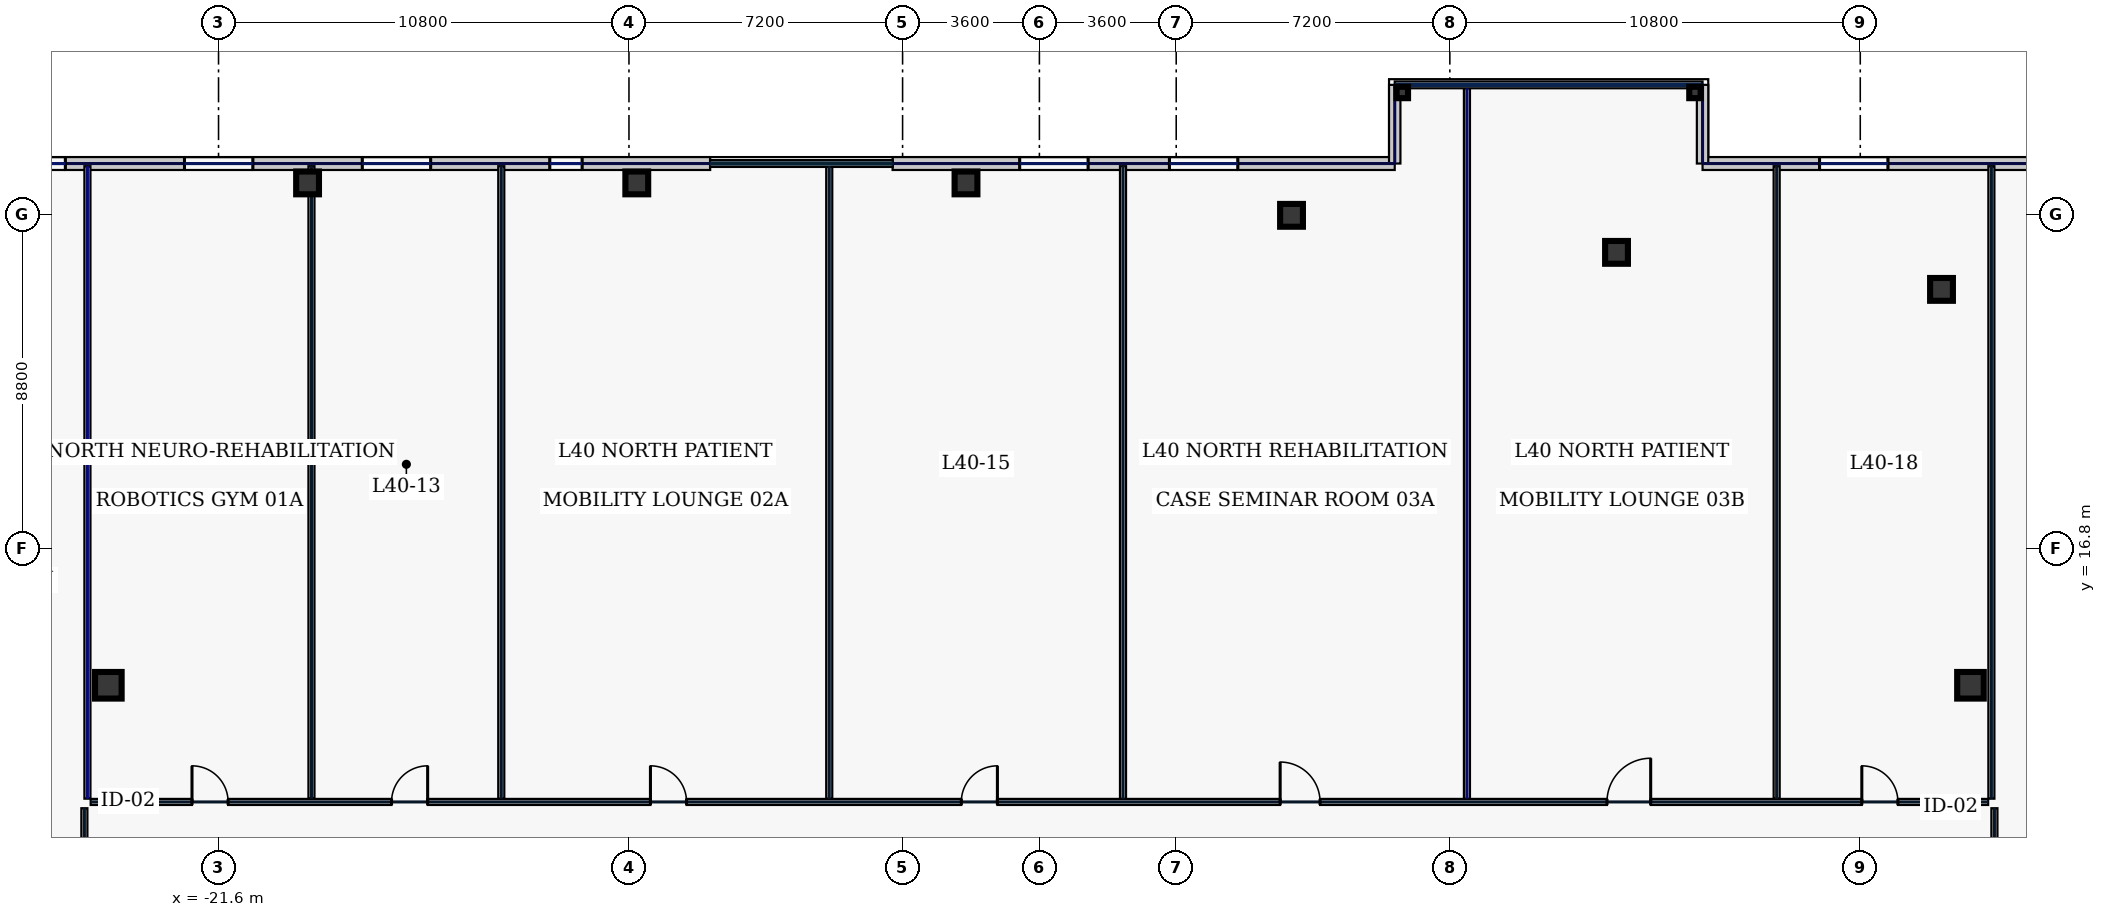
"""IFC4 building model, lengths in metres.
Left out: names, types, materials, properties, quantities, classifications, styles, units other than length and angle.
Written with IfcOpenShell. Run it as: python <this file> out.ifc"""

import sys

from ifc_helpers import new_model, si_unit, direction, frame, frame_2d, origin, origin_2d, place, context, subcontext, project, spatial, rectangle, hollow_rectangle, extrude, element, fill, save


model = new_model("IFC4")
c1 = context("Model", 3, precision=1e-05, world=origin(), true_north=direction((0.0, 1.0)))
c2 = subcontext(c1, "Body", "Model", "MODEL_VIEW")
j1 = project(units=[si_unit("LENGTHUNIT", "METRE"), si_unit("PLANEANGLEUNIT", "RADIAN")], contexts=[c1])
p1 = place(None, origin())
s1 = spatial("IfcSite", under=j1, at=p1, CompositionType="ELEMENT")
p2 = place(p1, origin())
s2 = spatial("IfcBuilding", under=s1, at=p2, CompositionType="ELEMENT")
p3 = place(p2, frame((0.0, 0.0, 176.2)))
s3 = spatial("IfcBuildingStorey", under=s2, at=p3, CompositionType="ELEMENT", Elevation=176.2)
for number, where, z_axis, x_axis in (
    (1, (-24.5, 13.2, 0.0), (0.0, 0.0, 1.0), (1.0, 0.0, 0.0)),
    (2, (24.5, 13.2, 0.0), (0.0, 0.0, 1.0), (1.0, 0.0, 0.0)),
):
    element("IfcColumn", number, at=place(p3, frame(where, z_axis=z_axis, x_axis=x_axis)), inside=s3, PredefinedType="COLUMN", context=c2, shape_type="SweptSolid", body=[
        extrude(hollow_rectangle(XDim=0.7, YDim=0.7, WallThickness=0.032, at=origin_2d()), origin(), (0.0, 0.0, 1.0), 3.74),
    ])
for number, where, z_axis, x_axis in (
    (3, (23.738, 23.618, 0.0), (0.0, 0.0, 1.0), (1.0, 0.0, 0.0)),
    (4, (15.186, 24.592, 0.0), (0.0, 0.0, 1.0), (1.0, 0.0, 0.0)),
    (5, (6.634, 25.567, 0.0), (0.0, 0.0, 1.0), (1.0, 0.0, 0.0)),
    (6, (-1.931, 26.42, 0.0), (0.0, 0.0, 1.0), (1.0, 0.0, 0.0)),
    (7, (-10.594, 26.42, 0.0), (0.0, 0.0, 1.0), (1.0, 0.0, 0.0)),
    (8, (-19.257, 26.42, 0.0), (0.0, 0.0, 1.0), (1.0, 0.0, 0.0)),
):
    element("IfcColumn", number, at=place(p3, frame(where, z_axis=z_axis, x_axis=x_axis)), inside=s3, PredefinedType="COLUMN", context=c2, shape_type="SweptSolid", body=[
        extrude(hollow_rectangle(XDim=0.6, YDim=0.6, WallThickness=0.028, at=origin_2d()), origin(), (0.0, 0.0, 1.0), 3.74),
    ])
for number, where, z_axis, x_axis in (
    (9, (9.55, 28.8, 0.0), (0.0, 0.0, 1.0), (1.0, 0.0, 0.0)),
    (10, (17.25, 28.8, 0.0), (0.0, 0.0, 1.0), (1.0, 0.0, 0.0)),
):
    element("IfcColumn", number, at=place(p3, frame(where, z_axis=z_axis, x_axis=x_axis)), inside=s3, PredefinedType="COLUMN", context=c2, shape_type="SweptSolid", body=[
        extrude(hollow_rectangle(XDim=0.3, YDim=0.3, WallThickness=0.016, at=origin_2d()), origin(), (0.0, 0.0, 1.0), 3.74),
    ])
p4 = place(p3, frame((33.4, 26.93, 0.0), z_axis=(0.0, 0.0, 1.0), x_axis=(-1.0, 0.0, 0.0)))
e11 = element("IfcWall", 11, at=p4, inside=s3, PredefinedType="STANDARD", context=c2, shape_type="SweptSolid", body=[
    extrude(rectangle(XDim=15.95, YDim=0.34, at=frame_2d((7.975, 0.0))), origin(), (0.0, 0.0, 1.0), 3.74),
])
p5 = place(p4, frame((11.071, 0.0, 0.7)))
e12 = element("IfcOpeningElement", 12, at=p5, cuts=e11, PredefinedType="OPENING", context=c2, shape_type="SweptSolid", body=[
    extrude(rectangle(XDim=1.8, YDim=2.2, at=frame_2d((0.9, 1.1))), frame((0.0, 0.18, 0.0), z_axis=(0.0, -1.0, 0.0), x_axis=(1.0, 0.0, 0.0)), (0.0, 0.0, 1.0), 0.36),
])
p6 = place(p4, frame((6.48, 0.0, 0.7)))
e13 = element("IfcOpeningElement", 13, at=p6, cuts=e11, PredefinedType="OPENING", context=c2, shape_type="SweptSolid", body=[
    extrude(rectangle(XDim=0.85, YDim=1.85, at=frame_2d((0.425, 0.925))), frame((0.0, 0.18, 0.0), z_axis=(0.0, -1.0, 0.0), x_axis=(1.0, 0.0, 0.0)), (0.0, 0.0, 1.0), 0.36),
])
p7 = place(p4, frame((2.591, 0.0, 0.7)))
e14 = element("IfcOpeningElement", 14, at=p7, cuts=e11, PredefinedType="OPENING", context=c2, shape_type="SweptSolid", body=[
    extrude(rectangle(XDim=1.8, YDim=2.2, at=frame_2d((0.9, 1.1))), frame((0.0, 0.18, 0.0), z_axis=(0.0, -1.0, 0.0), x_axis=(1.0, 0.0, 0.0)), (0.0, 0.0, 1.0), 0.36),
])
p8 = place(p3, frame((9.35, 26.93, 0.0), z_axis=(0.0, 0.0, 1.0), x_axis=(-1.0, 0.0, 0.0)))
e15 = element("IfcWall", 15, at=p8, inside=s3, PredefinedType="STANDARD", context=c2, shape_type="SweptSolid", body=[
    extrude(rectangle(XDim=13.213, YDim=0.34, at=frame_2d((6.606, 0.0))), origin(), (0.0, 0.0, 1.0), 3.74),
])
p9 = place(p8, frame((8.069, 0.0, 0.7)))
e16 = element("IfcOpeningElement", 16, at=p9, cuts=e15, PredefinedType="OPENING", context=c2, shape_type="SweptSolid", body=[
    extrude(rectangle(XDim=1.8, YDim=2.2, at=frame_2d((0.9, 1.1))), frame((0.0, 0.18, 0.0), z_axis=(0.0, -1.0, 0.0), x_axis=(1.0, 0.0, 0.0)), (0.0, 0.0, 1.0), 0.36),
])
p10 = place(p8, frame((4.128, 0.0, 0.7)))
e17 = element("IfcOpeningElement", 17, at=p10, cuts=e15, PredefinedType="OPENING", context=c2, shape_type="SweptSolid", body=[
    extrude(rectangle(XDim=1.8, YDim=2.2, at=frame_2d((0.9, 1.1))), frame((0.0, 0.18, 0.0), z_axis=(0.0, -1.0, 0.0), x_axis=(1.0, 0.0, 0.0)), (0.0, 0.0, 1.0), 0.36),
])
p11 = place(p3, frame((-8.663, 26.93, 0.0), z_axis=(0.0, 0.0, 1.0), x_axis=(-1.0, 0.0, 0.0)))
e18 = element("IfcWall", 18, at=p11, inside=s3, PredefinedType="STANDARD", context=c2, shape_type="SweptSolid", body=[
    extrude(rectangle(XDim=19.937, YDim=0.34, at=frame_2d((9.969, 0.0))), origin(), (0.0, 0.0, 1.0), 3.74),
])
p12 = place(p11, frame((16.968, 0.0, 0.7)))
e19 = element("IfcOpeningElement", 19, at=p12, cuts=e18, PredefinedType="OPENING", context=c2, shape_type="SweptSolid", body=[
    extrude(rectangle(XDim=0.85, YDim=1.85, at=frame_2d((0.425, 0.925))), frame((0.0, 0.18, 0.0), z_axis=(0.0, -1.0, 0.0), x_axis=(1.0, 0.0, 0.0)), (0.0, 0.0, 1.0), 0.36),
])
p13 = place(p11, frame((12.033, 0.0, 0.7)))
e20 = element("IfcOpeningElement", 20, at=p13, cuts=e18, PredefinedType="OPENING", context=c2, shape_type="SweptSolid", body=[
    extrude(rectangle(XDim=1.8, YDim=2.2, at=frame_2d((0.9, 1.1))), frame((0.0, 0.18, 0.0), z_axis=(0.0, -1.0, 0.0), x_axis=(1.0, 0.0, 0.0)), (0.0, 0.0, 1.0), 0.36),
])
p14 = place(p11, frame((7.355, 0.0, 0.7)))
e21 = element("IfcOpeningElement", 21, at=p14, cuts=e18, PredefinedType="OPENING", context=c2, shape_type="SweptSolid", body=[
    extrude(rectangle(XDim=1.8, YDim=2.2, at=frame_2d((0.9, 1.1))), frame((0.0, 0.18, 0.0), z_axis=(0.0, -1.0, 0.0), x_axis=(1.0, 0.0, 0.0)), (0.0, 0.0, 1.0), 0.36),
])
p15 = place(p11, frame((3.371, 0.0, 0.7)))
e22 = element("IfcOpeningElement", 22, at=p15, cuts=e18, PredefinedType="OPENING", context=c2, shape_type="SweptSolid", body=[
    extrude(rectangle(XDim=0.85, YDim=1.85, at=frame_2d((0.425, 0.925))), frame((0.0, 0.18, 0.0), z_axis=(0.0, -1.0, 0.0), x_axis=(1.0, 0.0, 0.0)), (0.0, 0.0, 1.0), 0.36),
])
for number, where, z_axis, x_axis in (
    (23, (9.35, 26.93, 0.0), (0.0, 0.0, 1.0), (0.0, 1.0, 0.0)),
    (24, (17.45, 26.93, 0.0), (0.0, 0.0, 1.0), (0.0, 1.0, 0.0)),
):
    element("IfcWall", number, at=place(p3, frame(where, z_axis=z_axis, x_axis=x_axis)), inside=s3, PredefinedType="STANDARD", context=c2, shape_type="SweptSolid", body=[
        extrude(rectangle(XDim=2.07, YDim=0.3, at=frame_2d((1.035, 0.0))), origin(), (0.0, 0.0, 1.0), 1.535),
    ])
p16 = place(p3, frame((-25.13, 6.985, 0.0), z_axis=(0.0, 0.0, 1.0), x_axis=(0.0, 1.0, 0.0)))
e25 = element("IfcWall", 25, at=p16, inside=s3, PredefinedType="PARTITIONING", context=c2, shape_type="SweptSolid", body=[
    extrude(rectangle(XDim=2.98, YDim=0.16, at=frame_2d((1.49, 0.0))), origin(), (0.0, 0.0, 1.0), 3.74),
])
p17 = place(p16, frame((1.1, 0.0, 0.0)))
e26 = element("IfcOpeningElement", 26, at=p17, cuts=e25, PredefinedType="OPENING", context=c2, shape_type="SweptSolid", body=[
    extrude(rectangle(XDim=0.95, YDim=2.2, at=frame_2d((0.475, 1.1))), frame((0.0, 0.09, 0.0), z_axis=(0.0, -1.0, 0.0), x_axis=(1.0, 0.0, 0.0)), (0.0, 0.0, 1.0), 0.18),
])
p18 = place(p3, frame((-24.965, 10.13, 0.0), z_axis=(0.0, 0.0, 1.0), x_axis=(1.0, 0.0, 0.0)))
e27 = element("IfcWall", 27, at=p18, inside=s3, PredefinedType="PARTITIONING", context=c2, shape_type="SweptSolid", body=[
    extrude(rectangle(XDim=49.93, YDim=0.16, at=frame_2d((24.965, 0.0))), origin(), (0.0, 0.0, 1.0), 3.74),
])
p19 = place(p18, frame((2.667, 0.0, 0.0)))
e28 = element("IfcOpeningElement", 28, at=p19, cuts=e27, PredefinedType="OPENING", context=c2, shape_type="SweptSolid", body=[
    extrude(rectangle(XDim=0.95, YDim=2.2, at=frame_2d((0.475, 1.1))), frame((0.0, 0.09, 0.0), z_axis=(0.0, -1.0, 0.0), x_axis=(1.0, 0.0, 0.0)), (0.0, 0.0, 1.0), 0.18),
])
p20 = place(p18, frame((7.917, 0.0, 0.0)))
e29 = element("IfcOpeningElement", 29, at=p20, cuts=e27, PredefinedType="OPENING", context=c2, shape_type="SweptSolid", body=[
    extrude(rectangle(XDim=0.95, YDim=2.2, at=frame_2d((0.475, 1.1))), frame((0.0, 0.09, 0.0), z_axis=(0.0, -1.0, 0.0), x_axis=(1.0, 0.0, 0.0)), (0.0, 0.0, 1.0), 0.18),
])
p21 = place(p18, frame((14.73, 0.0, 0.0)))
e30 = element("IfcOpeningElement", 30, at=p21, cuts=e27, PredefinedType="OPENING", context=c2, shape_type="SweptSolid", body=[
    extrude(rectangle(XDim=0.95, YDim=2.2, at=frame_2d((0.475, 1.1))), frame((0.0, 0.09, 0.0), z_axis=(0.0, -1.0, 0.0), x_axis=(1.0, 0.0, 0.0)), (0.0, 0.0, 1.0), 0.18),
])
p22 = place(p18, frame((22.91, 0.0, 0.0)))
e31 = element("IfcOpeningElement", 31, at=p22, cuts=e27, PredefinedType="OPENING", context=c2, shape_type="SweptSolid", body=[
    extrude(rectangle(XDim=0.95, YDim=2.2, at=frame_2d((0.475, 1.1))), frame((0.0, 0.09, 0.0), z_axis=(0.0, -1.0, 0.0), x_axis=(1.0, 0.0, 0.0)), (0.0, 0.0, 1.0), 0.18),
])
p23 = place(p18, frame((31.3, 0.0, 0.0)))
e32 = element("IfcOpeningElement", 32, at=p23, cuts=e27, PredefinedType="OPENING", context=c2, shape_type="SweptSolid", body=[
    extrude(rectangle(XDim=1.05, YDim=2.2, at=frame_2d((0.525, 1.1))), frame((0.0, 0.09, 0.0), z_axis=(0.0, -1.0, 0.0), x_axis=(1.0, 0.0, 0.0)), (0.0, 0.0, 1.0), 0.18),
])
p24 = place(p18, frame((39.9, 0.0, 0.0)))
e33 = element("IfcOpeningElement", 33, at=p24, cuts=e27, PredefinedType="OPENING", context=c2, shape_type="SweptSolid", body=[
    extrude(rectangle(XDim=1.15, YDim=2.2, at=frame_2d((0.575, 1.1))), frame((0.0, 0.09, 0.0), z_axis=(0.0, -1.0, 0.0), x_axis=(1.0, 0.0, 0.0)), (0.0, 0.0, 1.0), 0.18),
])
p25 = place(p18, frame((46.606, 0.0, 0.0)))
e34 = element("IfcOpeningElement", 34, at=p25, cuts=e27, PredefinedType="OPENING", context=c2, shape_type="SweptSolid", body=[
    extrude(rectangle(XDim=0.95, YDim=2.2, at=frame_2d((0.475, 1.1))), frame((0.0, 0.09, 0.0), z_axis=(0.0, -1.0, 0.0), x_axis=(1.0, 0.0, 0.0)), (0.0, 0.0, 1.0), 0.18),
])
p26 = place(p3, frame((25.13, 9.965, 0.0), z_axis=(0.0, 0.0, 1.0), x_axis=(0.0, -1.0, 0.0)))
e35 = element("IfcWall", 35, at=p26, inside=s3, PredefinedType="PARTITIONING", context=c2, shape_type="SweptSolid", body=[
    extrude(rectangle(XDim=2.98, YDim=0.16, at=frame_2d((1.49, 0.0))), origin(), (0.0, 0.0, 1.0), 3.74),
])
p27 = place(p26, frame((1.1, 0.0, 0.0)))
e36 = element("IfcOpeningElement", 36, at=p27, cuts=e35, PredefinedType="OPENING", context=c2, shape_type="SweptSolid", body=[
    extrude(rectangle(XDim=0.95, YDim=2.2, at=frame_2d((0.475, 1.1))), frame((0.0, 0.09, 0.0), z_axis=(0.0, -1.0, 0.0), x_axis=(1.0, 0.0, 0.0)), (0.0, 0.0, 1.0), 0.18),
])
p28 = place(p3, frame((-25.05, 10.215, 0.0), z_axis=(0.0, 0.0, 1.0), x_axis=(0.0, 1.0, 0.0)))
e37 = element("IfcWall", 37, at=p28, inside=s3, PredefinedType="PARTITIONING", context=c2, shape_type="SweptSolid", body=[
    extrude(rectangle(XDim=16.645, YDim=0.16, at=frame_2d((8.323, 0.0))), origin(), (0.0, 0.0, 1.0), 3.285),
])
for number, where, z_axis, x_axis in (
    (38, (25.05, 10.215, 0.0), (0.0, 0.0, 1.0), (0.0, 1.0, 0.0)),
    (39, (-14.16, 10.215, 0.0), (0.0, 0.0, 1.0), (0.0, 1.0, 0.0)),
    (40, (2.2, 10.215, 0.0), (0.0, 0.0, 1.0), (0.0, 1.0, 0.0)),
    (41, (19.4, 10.215, 0.0), (0.0, 0.0, 1.0), (0.0, 1.0, 0.0)),
    (42, (-19.155, 10.215, 0.0), (0.0, 0.0, 1.0), (0.0, 1.0, 0.0)),
    (43, (-5.53, 10.215, 0.0), (0.0, 0.0, 1.0), (0.0, 1.0, 0.0)),
):
    element("IfcWall", number, at=place(p3, frame(where, z_axis=z_axis, x_axis=x_axis)), inside=s3, PredefinedType="PARTITIONING", context=c2, shape_type="SweptSolid", body=[
        extrude(rectangle(XDim=16.645, YDim=0.16, at=frame_2d((8.323, 0.0))), origin(), (0.0, 0.0, 1.0), 3.74),
    ])
p29 = place(p3, frame((11.25, 10.215, 0.0), z_axis=(0.0, 0.0, 1.0), x_axis=(0.0, 1.0, 0.0)))
e44 = element("IfcWall", 44, at=p29, inside=s3, PredefinedType="PARTITIONING", context=c2, shape_type="SweptSolid", body=[
    extrude(rectangle(XDim=18.695, YDim=0.16, at=frame_2d((9.347, 0.0))), origin(), (0.0, 0.0, 1.0), 1.535),
])
p30 = place(p5, origin())
e45 = element("IfcWindow", 45, at=p30, inside=s3, PartitioningType="SINGLE_PANEL", PredefinedType="WINDOW", context=c2, shape_type="SweptSolid", body=[
    extrude(rectangle(XDim=1.8, YDim=2.2, at=frame_2d((0.9, 1.1))), frame((0.0, 0.03, 0.0), z_axis=(0.0, -1.0, 0.0), x_axis=(1.0, 0.0, 0.0)), (0.0, 0.0, 1.0), 0.06),
])
fill(e12, e45)
p31 = place(p9, origin())
e46 = element("IfcWindow", 46, at=p31, inside=s3, PartitioningType="SINGLE_PANEL", PredefinedType="WINDOW", context=c2, shape_type="SweptSolid", body=[
    extrude(rectangle(XDim=1.8, YDim=2.2, at=frame_2d((0.9, 1.1))), frame((0.0, 0.03, 0.0), z_axis=(0.0, -1.0, 0.0), x_axis=(1.0, 0.0, 0.0)), (0.0, 0.0, 1.0), 0.06),
])
fill(e16, e46)
p32 = place(p10, origin())
e47 = element("IfcWindow", 47, at=p32, inside=s3, PartitioningType="SINGLE_PANEL", PredefinedType="WINDOW", context=c2, shape_type="SweptSolid", body=[
    extrude(rectangle(XDim=1.8, YDim=2.2, at=frame_2d((0.9, 1.1))), frame((0.0, 0.03, 0.0), z_axis=(0.0, -1.0, 0.0), x_axis=(1.0, 0.0, 0.0)), (0.0, 0.0, 1.0), 0.06),
])
fill(e17, e47)
p33 = place(p12, origin())
e48 = element("IfcWindow", 48, at=p33, inside=s3, PartitioningType="SINGLE_PANEL", PredefinedType="WINDOW", context=c2, shape_type="SweptSolid", body=[
    extrude(rectangle(XDim=0.85, YDim=1.85, at=frame_2d((0.425, 0.925))), frame((0.0, 0.03, 0.0), z_axis=(0.0, -1.0, 0.0), x_axis=(1.0, 0.0, 0.0)), (0.0, 0.0, 1.0), 0.06),
])
fill(e19, e48)
p34 = place(p13, origin())
e49 = element("IfcWindow", 49, at=p34, inside=s3, PartitioningType="SINGLE_PANEL", PredefinedType="WINDOW", context=c2, shape_type="SweptSolid", body=[
    extrude(rectangle(XDim=1.8, YDim=2.2, at=frame_2d((0.9, 1.1))), frame((0.0, 0.03, 0.0), z_axis=(0.0, -1.0, 0.0), x_axis=(1.0, 0.0, 0.0)), (0.0, 0.0, 1.0), 0.06),
])
fill(e20, e49)
p35 = place(p14, origin())
e50 = element("IfcWindow", 50, at=p35, inside=s3, PartitioningType="SINGLE_PANEL", PredefinedType="WINDOW", context=c2, shape_type="SweptSolid", body=[
    extrude(rectangle(XDim=1.8, YDim=2.2, at=frame_2d((0.9, 1.1))), frame((0.0, 0.03, 0.0), z_axis=(0.0, -1.0, 0.0), x_axis=(1.0, 0.0, 0.0)), (0.0, 0.0, 1.0), 0.06),
])
fill(e21, e50)
p36 = place(p15, origin())
e51 = element("IfcWindow", 51, at=p36, inside=s3, PartitioningType="SINGLE_PANEL", PredefinedType="WINDOW", context=c2, shape_type="SweptSolid", body=[
    extrude(rectangle(XDim=0.85, YDim=1.85, at=frame_2d((0.425, 0.925))), frame((0.0, 0.03, 0.0), z_axis=(0.0, -1.0, 0.0), x_axis=(1.0, 0.0, 0.0)), (0.0, 0.0, 1.0), 0.06),
])
fill(e22, e51)
p37 = place(p19, origin())
e52 = element("IfcDoor", 52, at=p37, inside=s3, OperationType="SINGLE_SWING_LEFT", PredefinedType="DOOR", context=c2, shape_type="SweptSolid", body=[
    extrude(rectangle(XDim=0.95, YDim=2.2, at=frame_2d((0.475, 1.1))), frame((0.0, 0.025, 0.0), z_axis=(0.0, -1.0, 0.0), x_axis=(1.0, 0.0, 0.0)), (0.0, 0.0, 1.0), 0.05),
])
fill(e28, e52)
p38 = place(p20, origin())
e53 = element("IfcDoor", 53, at=p38, inside=s3, OperationType="SINGLE_SWING_RIGHT", PredefinedType="DOOR", context=c2, shape_type="SweptSolid", body=[
    extrude(rectangle(XDim=0.95, YDim=2.2, at=frame_2d((0.475, 1.1))), frame((0.0, 0.025, 0.0), z_axis=(0.0, -1.0, 0.0), x_axis=(1.0, 0.0, 0.0)), (0.0, 0.0, 1.0), 0.05),
])
fill(e29, e53)
p39 = place(p21, origin())
e54 = element("IfcDoor", 54, at=p39, inside=s3, OperationType="SINGLE_SWING_LEFT", PredefinedType="DOOR", context=c2, shape_type="SweptSolid", body=[
    extrude(rectangle(XDim=0.95, YDim=2.2, at=frame_2d((0.475, 1.1))), frame((0.0, 0.025, 0.0), z_axis=(0.0, -1.0, 0.0), x_axis=(1.0, 0.0, 0.0)), (0.0, 0.0, 1.0), 0.05),
])
fill(e30, e54)
p40 = place(p22, origin())
e55 = element("IfcDoor", 55, at=p40, inside=s3, OperationType="SINGLE_SWING_RIGHT", PredefinedType="DOOR", context=c2, shape_type="SweptSolid", body=[
    extrude(rectangle(XDim=0.95, YDim=2.2, at=frame_2d((0.475, 1.1))), frame((0.0, 0.025, 0.0), z_axis=(0.0, -1.0, 0.0), x_axis=(1.0, 0.0, 0.0)), (0.0, 0.0, 1.0), 0.05),
])
fill(e31, e55)
p41 = place(p23, origin())
e56 = element("IfcDoor", 56, at=p41, inside=s3, OperationType="SINGLE_SWING_LEFT", PredefinedType="DOOR", context=c2, shape_type="SweptSolid", body=[
    extrude(rectangle(XDim=1.05, YDim=2.2, at=frame_2d((0.525, 1.1))), frame((0.0, 0.025, 0.0), z_axis=(0.0, -1.0, 0.0), x_axis=(1.0, 0.0, 0.0)), (0.0, 0.0, 1.0), 0.05),
])
fill(e32, e56)
p42 = place(p24, origin())
e57 = element("IfcDoor", 57, at=p42, inside=s3, OperationType="SINGLE_SWING_RIGHT", PredefinedType="DOOR", context=c2, shape_type="SweptSolid", body=[
    extrude(rectangle(XDim=1.15, YDim=2.2, at=frame_2d((0.575, 1.1))), frame((0.0, 0.025, 0.0), z_axis=(0.0, -1.0, 0.0), x_axis=(1.0, 0.0, 0.0)), (0.0, 0.0, 1.0), 0.05),
])
fill(e33, e57)
p43 = place(p25, origin())
e58 = element("IfcDoor", 58, at=p43, inside=s3, OperationType="SINGLE_SWING_LEFT", PredefinedType="DOOR", context=c2, shape_type="SweptSolid", body=[
    extrude(rectangle(XDim=0.95, YDim=2.2, at=frame_2d((0.475, 1.1))), frame((0.0, 0.025, 0.0), z_axis=(0.0, -1.0, 0.0), x_axis=(1.0, 0.0, 0.0)), (0.0, 0.0, 1.0), 0.05),
])
fill(e34, e58)
save(model, sys.argv[1])
